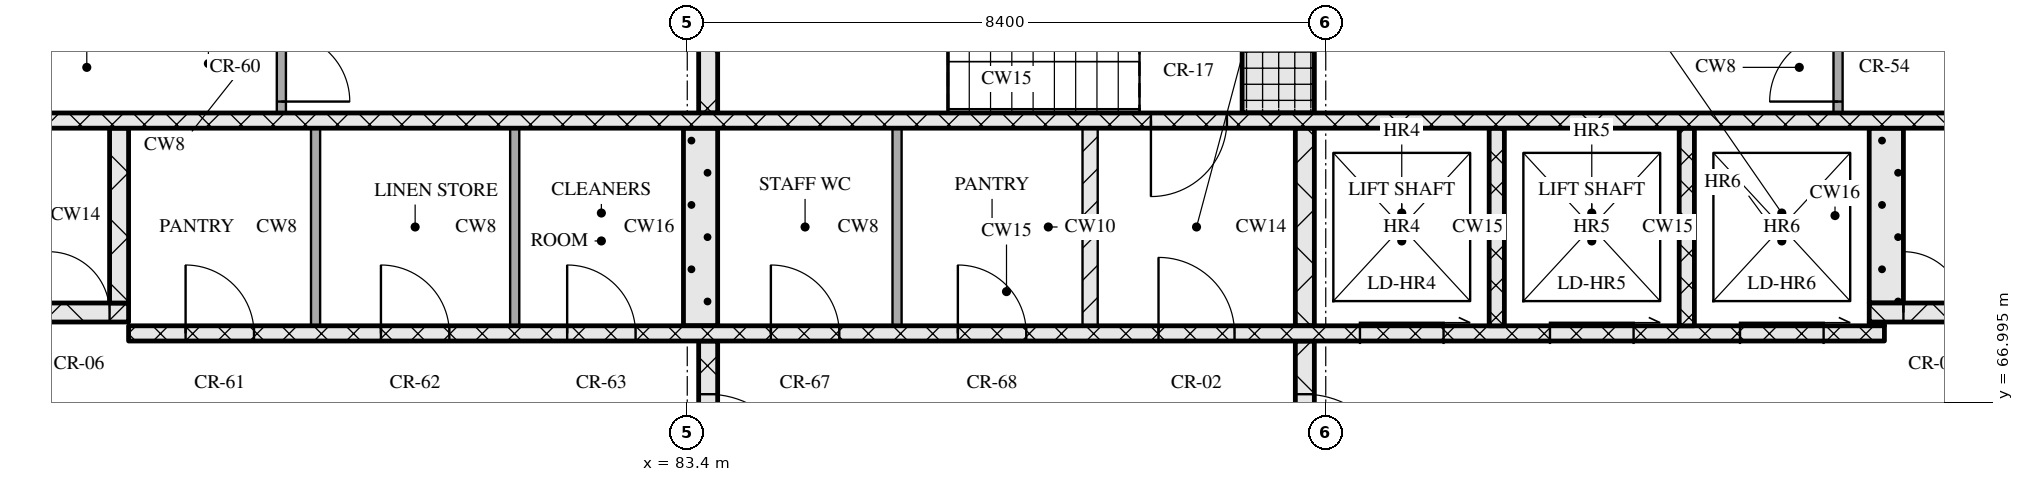
"""IFC4 building model, lengths in metres.
Left out: names, types, materials, properties, quantities, classifications, styles, units other than length and angle.
Written with IfcOpenShell. Run it as: python <this file> out.ifc"""

import sys

from ifc_helpers import new_model, si_unit, direction, frame, frame_2d, origin, place, context, subcontext, project, spatial, rectangle, extrude, element, fill, save


model = new_model("IFC4")
c1 = context("Model", 3, precision=1e-05, world=origin(), true_north=direction((0.0, 1.0)))
c2 = subcontext(c1, "Body", "Model", "MODEL_VIEW")
j1 = project(units=[si_unit("LENGTHUNIT", "METRE"), si_unit("PLANEANGLEUNIT", "RADIAN")], contexts=[c1])
p1 = place(None, origin())
s1 = spatial("IfcSite", under=j1, at=p1, CompositionType="ELEMENT")
p2 = place(p1, origin())
s2 = spatial("IfcBuilding", under=s1, at=p2, CompositionType="ELEMENT")
p3 = place(p2, frame((0.0, 0.0, 237.9)))
s3 = spatial("IfcBuildingStorey", under=s2, at=p3, CompositionType="ELEMENT", Elevation=237.9)
p4 = place(p3, frame((83.675, 65.2, 0.0), z_axis=(0.0, 0.0, 1.0), x_axis=(0.0, 1.0, 0.0)))
e1 = element("IfcWall", 1, at=p4, inside=s3, PredefinedType="SOLIDWALL", context=c2, shape_type="SweptSolid", body=[
    extrude(rectangle(XDim=2.6, YDim=0.25, at=frame_2d((1.3, 0.0))), origin(), (0.0, 0.0, 1.0), 3.32),
])
p5 = place(p4, frame((0.7, 0.0, 0.0)))
e2 = element("IfcOpeningElement", 2, at=p5, cuts=e1, PredefinedType="OPENING", context=c2, shape_type="SweptSolid", body=[
    extrude(rectangle(XDim=1.2, YDim=2.1, at=frame_2d((0.6, 1.05))), frame((0.0, 0.135, 0.0), z_axis=(0.0, -1.0, 0.0), x_axis=(1.0, 0.0, 0.0)), (0.0, 0.0, 1.0), 0.27),
])
p6 = place(p3, frame((91.525, 65.2, 0.0), z_axis=(0.0, 0.0, 1.0), x_axis=(0.0, 1.0, 0.0)))
e3 = element("IfcWall", 3, at=p6, inside=s3, PredefinedType="SOLIDWALL", context=c2, shape_type="SweptSolid", body=[
    extrude(rectangle(XDim=2.6, YDim=0.25, at=frame_2d((1.3, 0.0))), origin(), (0.0, 0.0, 1.0), 3.32),
])
p7 = place(p6, frame((0.7, 0.0, 0.0)))
e4 = element("IfcOpeningElement", 4, at=p7, cuts=e3, PredefinedType="OPENING", context=c2, shape_type="SweptSolid", body=[
    extrude(rectangle(XDim=1.2, YDim=2.1, at=frame_2d((0.6, 1.05))), frame((0.0, 0.135, 0.0), z_axis=(0.0, -1.0, 0.0), x_axis=(1.0, 0.0, 0.0)), (0.0, 0.0, 1.0), 0.27),
])
p8 = place(p3, frame((76.05, 67.9, 0.0), z_axis=(0.0, 0.0, 1.0), x_axis=(1.0, 0.0, 0.0)))
e5 = element("IfcWall", 5, at=p8, inside=s3, PredefinedType="SOLIDWALL", context=c2, shape_type="SweptSolid", body=[
    extrude(rectangle(XDim=23.1, YDim=0.2, at=frame_2d((11.55, 0.0))), origin(), (0.0, 0.0, 1.0), 3.32),
])
p9 = place(p8, frame((0.75, 0.0, 0.0)))
e6 = element("IfcOpeningElement", 6, at=p9, cuts=e5, PredefinedType="OPENING", context=c2, shape_type="SweptSolid", body=[
    extrude(rectangle(XDim=0.9, YDim=2.1, at=frame_2d((0.45, 1.05))), frame((0.0, 0.11, 0.0), z_axis=(0.0, -1.0, 0.0), x_axis=(1.0, 0.0, 0.0)), (0.0, 0.0, 1.0), 0.22),
])
p10 = place(p8, frame((3.32, 0.0, 0.0)))
e7 = element("IfcOpeningElement", 7, at=p10, cuts=e5, PredefinedType="OPENING", context=c2, shape_type="SweptSolid", body=[
    extrude(rectangle(XDim=0.9, YDim=2.1, at=frame_2d((0.45, 1.05))), frame((0.0, 0.11, 0.0), z_axis=(0.0, -1.0, 0.0), x_axis=(1.0, 0.0, 0.0)), (0.0, 0.0, 1.0), 0.22),
])
p11 = place(p8, frame((5.77, 0.0, 0.0)))
e8 = element("IfcOpeningElement", 8, at=p11, cuts=e5, PredefinedType="OPENING", context=c2, shape_type="SweptSolid", body=[
    extrude(rectangle(XDim=0.9, YDim=2.1, at=frame_2d((0.45, 1.05))), frame((0.0, 0.11, 0.0), z_axis=(0.0, -1.0, 0.0), x_axis=(1.0, 0.0, 0.0)), (0.0, 0.0, 1.0), 0.22),
])
p12 = place(p8, frame((8.45, 0.0, 0.0)))
e9 = element("IfcOpeningElement", 9, at=p12, cuts=e5, PredefinedType="OPENING", context=c2, shape_type="SweptSolid", body=[
    extrude(rectangle(XDim=0.9, YDim=2.1, at=frame_2d((0.45, 1.05))), frame((0.0, 0.11, 0.0), z_axis=(0.0, -1.0, 0.0), x_axis=(1.0, 0.0, 0.0)), (0.0, 0.0, 1.0), 0.22),
])
p13 = place(p8, frame((10.91, 0.0, 0.0)))
e10 = element("IfcOpeningElement", 10, at=p13, cuts=e5, PredefinedType="OPENING", context=c2, shape_type="SweptSolid", body=[
    extrude(rectangle(XDim=0.9, YDim=2.1, at=frame_2d((0.45, 1.05))), frame((0.0, 0.11, 0.0), z_axis=(0.0, -1.0, 0.0), x_axis=(1.0, 0.0, 0.0)), (0.0, 0.0, 1.0), 0.22),
])
p14 = place(p8, frame((13.55, 0.0, 0.0)))
e11 = element("IfcOpeningElement", 11, at=p14, cuts=e5, PredefinedType="OPENING", context=c2, shape_type="SweptSolid", body=[
    extrude(rectangle(XDim=1.0, YDim=2.1, at=frame_2d((0.5, 1.05))), frame((0.0, 0.11, 0.0), z_axis=(0.0, -1.0, 0.0), x_axis=(1.0, 0.0, 0.0)), (0.0, 0.0, 1.0), 0.22),
])
p15 = place(p8, frame((16.2, 0.0, 0.0)))
e12 = element("IfcOpeningElement", 12, at=p15, cuts=e5, PredefinedType="OPENING", context=c2, shape_type="SweptSolid", body=[
    extrude(rectangle(XDim=1.1, YDim=2.1, at=frame_2d((0.55, 1.05))), frame((0.0, 0.11, 0.0), z_axis=(0.0, -1.0, 0.0), x_axis=(1.0, 0.0, 0.0)), (0.0, 0.0, 1.0), 0.22),
])
p16 = place(p8, frame((18.7, 0.0, 0.0)))
e13 = element("IfcOpeningElement", 13, at=p16, cuts=e5, PredefinedType="OPENING", context=c2, shape_type="SweptSolid", body=[
    extrude(rectangle(XDim=1.1, YDim=2.1, at=frame_2d((0.55, 1.05))), frame((0.0, 0.11, 0.0), z_axis=(0.0, -1.0, 0.0), x_axis=(1.0, 0.0, 0.0)), (0.0, 0.0, 1.0), 0.22),
])
p17 = place(p8, frame((21.2, 0.0, 0.0)))
e14 = element("IfcOpeningElement", 14, at=p17, cuts=e5, PredefinedType="OPENING", context=c2, shape_type="SweptSolid", body=[
    extrude(rectangle(XDim=1.1, YDim=2.1, at=frame_2d((0.55, 1.05))), frame((0.0, 0.11, 0.0), z_axis=(0.0, -1.0, 0.0), x_axis=(1.0, 0.0, 0.0)), (0.0, 0.0, 1.0), 0.22),
])
for number, where, z_axis, x_axis in (
    (15, (78.51, 68.0, 0.0), (0.0, 0.0, 1.0), (0.0, 1.0, 0.0)),
    (16, (81.13, 68.0, 0.0), (0.0, 0.0, 1.0), (0.0, 1.0, 0.0)),
):
    element("IfcWall", number, at=place(p3, frame(where, z_axis=z_axis, x_axis=x_axis)), inside=s3, PredefinedType="PARTITIONING", context=c2, shape_type="SweptSolid", body=[
        extrude(rectangle(XDim=2.6, YDim=0.12, at=frame_2d((1.3, 0.0))), origin(), (0.0, 0.0, 1.0), 3.32),
    ])
p18 = place(p3, frame((83.575, 68.0, 0.0), z_axis=(0.0, 0.0, 1.0), x_axis=(0.0, 1.0, 0.0)))
e17 = element("IfcWall", 17, at=p18, inside=s3, PredefinedType="SOLIDWALL", context=c2, shape_type="SweptSolid", body=[
    extrude(rectangle(XDim=2.6, YDim=0.45, at=frame_2d((1.3, 0.0))), origin(), (0.0, 0.0, 1.0), 3.32),
])
p19 = place(p3, frame((86.16, 68.0, 0.0), z_axis=(0.0, 0.0, 1.0), x_axis=(0.0, 1.0, 0.0)))
e18 = element("IfcWall", 18, at=p19, inside=s3, PredefinedType="PARTITIONING", context=c2, shape_type="SweptSolid", body=[
    extrude(rectangle(XDim=2.6, YDim=0.12, at=frame_2d((1.3, 0.0))), origin(), (0.0, 0.0, 1.0), 3.32),
])
p20 = place(p3, frame((88.7, 68.0, 0.0), z_axis=(0.0, 0.0, 1.0), x_axis=(0.0, 1.0, 0.0)))
e19 = element("IfcWall", 19, at=p20, inside=s3, PredefinedType="PARTITIONING", context=c2, shape_type="SweptSolid", body=[
    extrude(rectangle(XDim=2.6, YDim=0.2, at=frame_2d((1.3, 0.0))), origin(), (0.0, 0.0, 1.0), 3.32),
])
p21 = place(p3, frame((91.525, 68.0, 0.0), z_axis=(0.0, 0.0, 1.0), x_axis=(0.0, 1.0, 0.0)))
e20 = element("IfcWall", 20, at=p21, inside=s3, PredefinedType="SOLIDWALL", context=c2, shape_type="SweptSolid", body=[
    extrude(rectangle(XDim=2.6, YDim=0.25, at=frame_2d((1.3, 0.0))), origin(), (0.0, 0.0, 1.0), 3.32),
])
for number, where, z_axis, x_axis in (
    (21, (94.05, 68.0, 0.0), (0.0, 0.0, 1.0), (0.0, 1.0, 0.0)),
    (22, (96.55, 68.0, 0.0), (0.0, 0.0, 1.0), (0.0, 1.0, 0.0)),
):
    element("IfcWall", number, at=place(p3, frame(where, z_axis=z_axis, x_axis=x_axis)), inside=s3, PredefinedType="SOLIDWALL", context=c2, shape_type="SweptSolid", body=[
        extrude(rectangle(XDim=2.6, YDim=0.2, at=frame_2d((1.3, 0.0))), origin(), (0.0, 0.0, 1.0), 3.32),
    ])
p22 = place(p3, frame((98.95, 68.025, 0.0), z_axis=(0.0, 0.0, 1.0), x_axis=(1.0, 0.0, 0.0)))
e23 = element("IfcWall", 23, at=p22, inside=s3, PredefinedType="SOLIDWALL", context=c2, shape_type="SweptSolid", body=[
    extrude(rectangle(XDim=0.2, YDim=0.05, at=frame_2d((0.1, 0.0))), origin(), (0.0, 0.0, 1.0), 3.32),
])
p23 = place(p3, frame((67.8, 68.175, 0.0), z_axis=(0.0, 0.0, 1.0), x_axis=(1.0, 0.0, 0.0)))
e24 = element("IfcWall", 24, at=p23, inside=s3, PredefinedType="SOLIDWALL", context=c2, shape_type="SweptSolid", body=[
    extrude(rectangle(XDim=8.25, YDim=0.25, at=frame_2d((4.125, 0.0))), origin(), (0.0, 0.0, 1.0), 3.32),
])
p24 = place(p23, frame((5.7, 0.0, 0.0)))
e25 = element("IfcOpeningElement", 25, at=p24, cuts=e24, PredefinedType="OPENING", context=c2, shape_type="SweptSolid", body=[
    extrude(rectangle(XDim=1.0, YDim=2.1, at=frame_2d((0.5, 1.05))), frame((0.0, 0.135, 0.0), z_axis=(0.0, -1.0, 0.0), x_axis=(1.0, 0.0, 0.0)), (0.0, 0.0, 1.0), 0.27),
])
p25 = place(p23, frame((7.2, 0.0, 0.0)))
e26 = element("IfcOpeningElement", 26, at=p25, cuts=e24, PredefinedType="OPENING", context=c2, shape_type="SweptSolid", body=[
    extrude(rectangle(XDim=0.8, YDim=2.1, at=frame_2d((0.4, 1.05))), frame((0.0, 0.135, 0.0), z_axis=(0.0, -1.0, 0.0), x_axis=(1.0, 0.0, 0.0)), (0.0, 0.0, 1.0), 0.27),
])
p26 = place(p3, frame((98.95, 68.175, 0.0), z_axis=(0.0, 0.0, 1.0), x_axis=(1.0, 0.0, 0.0)))
e27 = element("IfcWall", 27, at=p26, inside=s3, PredefinedType="SOLIDWALL", context=c2, shape_type="SweptSolid", body=[
    extrude(rectangle(XDim=8.45, YDim=0.25, at=frame_2d((4.225, 0.0))), origin(), (0.0, 0.0, 1.0), 3.32),
])
p27 = place(p26, frame((0.45, 0.0, 0.0)))
e28 = element("IfcOpeningElement", 28, at=p27, cuts=e27, PredefinedType="OPENING", context=c2, shape_type="SweptSolid", body=[
    extrude(rectangle(XDim=0.8, YDim=2.1, at=frame_2d((0.4, 1.05))), frame((0.0, 0.135, 0.0), z_axis=(0.0, -1.0, 0.0), x_axis=(1.0, 0.0, 0.0)), (0.0, 0.0, 1.0), 0.27),
])
p28 = place(p26, frame((1.75, 0.0, 0.0)))
e29 = element("IfcOpeningElement", 29, at=p28, cuts=e27, PredefinedType="OPENING", context=c2, shape_type="SweptSolid", body=[
    extrude(rectangle(XDim=1.0, YDim=2.1, at=frame_2d((0.5, 1.05))), frame((0.0, 0.135, 0.0), z_axis=(0.0, -1.0, 0.0), x_axis=(1.0, 0.0, 0.0)), (0.0, 0.0, 1.0), 0.27),
])
p29 = place(p3, frame((75.925, 68.3, 0.0), z_axis=(0.0, 0.0, 1.0), x_axis=(0.0, 1.0, 0.0)))
e30 = element("IfcWall", 30, at=p29, inside=s3, PredefinedType="SOLIDWALL", context=c2, shape_type="SweptSolid", body=[
    extrude(rectangle(XDim=2.3, YDim=0.25, at=frame_2d((1.15, 0.0))), origin(), (0.0, 0.0, 1.0), 3.32),
])
p30 = place(p3, frame((99.175, 68.3, 0.0), z_axis=(0.0, 0.0, 1.0), x_axis=(0.0, 1.0, 0.0)))
e31 = element("IfcWall", 31, at=p30, inside=s3, PredefinedType="SOLIDWALL", context=c2, shape_type="SweptSolid", body=[
    extrude(rectangle(XDim=2.3, YDim=0.45, at=frame_2d((1.15, 0.0))), origin(), (0.0, 0.0, 1.0), 3.32),
])
p31 = place(p3, frame((67.8, 70.7, 0.0), z_axis=(0.0, 0.0, 1.0), x_axis=(1.0, 0.0, 0.0)))
e32 = element("IfcWall", 32, at=p31, inside=s3, PredefinedType="SOLIDWALL", context=c2, shape_type="SweptSolid", body=[
    extrude(rectangle(XDim=39.6, YDim=0.2, at=frame_2d((19.8, 0.0))), origin(), (0.0, 0.0, 1.0), 3.32),
])
p32 = place(p31, frame((0.65, 0.0, 0.0)))
e33 = element("IfcOpeningElement", 33, at=p32, cuts=e32, PredefinedType="OPENING", context=c2, shape_type="SweptSolid", body=[
    extrude(rectangle(XDim=1.1, YDim=2.1, at=frame_2d((0.55, 1.05))), frame((0.0, 0.11, 0.0), z_axis=(0.0, -1.0, 0.0), x_axis=(1.0, 0.0, 0.0)), (0.0, 0.0, 1.0), 0.22),
])
p33 = place(p31, frame((3.25, 0.0, 0.0)))
e34 = element("IfcOpeningElement", 34, at=p33, cuts=e32, PredefinedType="OPENING", context=c2, shape_type="SweptSolid", body=[
    extrude(rectangle(XDim=1.1, YDim=2.1, at=frame_2d((0.55, 1.05))), frame((0.0, 0.11, 0.0), z_axis=(0.0, -1.0, 0.0), x_axis=(1.0, 0.0, 0.0)), (0.0, 0.0, 1.0), 0.22),
])
p34 = place(p31, frame((5.9, 0.0, 0.0)))
e35 = element("IfcOpeningElement", 35, at=p34, cuts=e32, PredefinedType="OPENING", context=c2, shape_type="SweptSolid", body=[
    extrude(rectangle(XDim=1.0, YDim=2.1, at=frame_2d((0.5, 1.05))), frame((0.0, 0.11, 0.0), z_axis=(0.0, -1.0, 0.0), x_axis=(1.0, 0.0, 0.0)), (0.0, 0.0, 1.0), 0.22),
])
p35 = place(p31, frame((21.7, 0.0, 0.0)))
e36 = element("IfcOpeningElement", 36, at=p35, cuts=e32, PredefinedType="OPENING", context=c2, shape_type="SweptSolid", body=[
    extrude(rectangle(XDim=1.0, YDim=2.1, at=frame_2d((0.5, 1.05))), frame((0.0, 0.11, 0.0), z_axis=(0.0, -1.0, 0.0), x_axis=(1.0, 0.0, 0.0)), (0.0, 0.0, 1.0), 0.22),
])
p36 = place(p31, frame((32.7, 0.0, 0.0)))
e37 = element("IfcOpeningElement", 37, at=p36, cuts=e32, PredefinedType="OPENING", context=c2, shape_type="SweptSolid", body=[
    extrude(rectangle(XDim=1.0, YDim=2.1, at=frame_2d((0.5, 1.05))), frame((0.0, 0.11, 0.0), z_axis=(0.0, -1.0, 0.0), x_axis=(1.0, 0.0, 0.0)), (0.0, 0.0, 1.0), 0.22),
])
p37 = place(p31, frame((35.25, 0.0, 0.0)))
e38 = element("IfcOpeningElement", 38, at=p37, cuts=e32, PredefinedType="OPENING", context=c2, shape_type="SweptSolid", body=[
    extrude(rectangle(XDim=1.1, YDim=2.1, at=frame_2d((0.55, 1.05))), frame((0.0, 0.11, 0.0), z_axis=(0.0, -1.0, 0.0), x_axis=(1.0, 0.0, 0.0)), (0.0, 0.0, 1.0), 0.22),
])
p38 = place(p31, frame((37.85, 0.0, 0.0)))
e39 = element("IfcOpeningElement", 39, at=p38, cuts=e32, PredefinedType="OPENING", context=c2, shape_type="SweptSolid", body=[
    extrude(rectangle(XDim=1.1, YDim=2.1, at=frame_2d((0.55, 1.05))), frame((0.0, 0.11, 0.0), z_axis=(0.0, -1.0, 0.0), x_axis=(1.0, 0.0, 0.0)), (0.0, 0.0, 1.0), 0.22),
])
p39 = place(p3, frame((78.06, 70.8, 0.0), z_axis=(0.0, 0.0, 1.0), x_axis=(0.0, 1.0, 0.0)))
e40 = element("IfcWall", 40, at=p39, inside=s3, PredefinedType="PARTITIONING", context=c2, shape_type="SweptSolid", body=[
    extrude(rectangle(XDim=1.2, YDim=0.12, at=frame_2d((0.6, 0.0))), origin(), (0.0, 0.0, 1.0), 3.32),
])
p40 = place(p39, frame((0.15, 0.0, 0.0)))
e41 = element("IfcOpeningElement", 41, at=p40, cuts=e40, PredefinedType="OPENING", context=c2, shape_type="SweptSolid", body=[
    extrude(rectangle(XDim=0.9, YDim=2.1, at=frame_2d((0.45, 1.05))), frame((0.0, 0.07, 0.0), z_axis=(0.0, -1.0, 0.0), x_axis=(1.0, 0.0, 0.0)), (0.0, 0.0, 1.0), 0.14),
])
p41 = place(p3, frame((83.675, 70.8, 0.0), z_axis=(0.0, 0.0, 1.0), x_axis=(0.0, 1.0, 0.0)))
e42 = element("IfcWall", 42, at=p41, inside=s3, PredefinedType="SOLIDWALL", context=c2, shape_type="SweptSolid", body=[
    extrude(rectangle(XDim=2.95, YDim=0.25, at=frame_2d((1.475, 0.0))), origin(), (0.0, 0.0, 1.0), 3.32),
])
p42 = place(p3, frame((91.175, 70.8, 0.0), z_axis=(0.0, 0.0, 1.0), x_axis=(0.0, 1.0, 0.0)))
e43 = element("IfcWall", 43, at=p42, inside=s3, PredefinedType="SOLIDWALL", context=c2, shape_type="SweptSolid", body=[
    extrude(rectangle(XDim=2.95, YDim=0.95, at=frame_2d((1.475, 0.0))), origin(), (0.0, 0.0, 1.0), 3.32),
])
p43 = place(p3, frame((98.54, 70.8, 0.0), z_axis=(0.0, 0.0, 1.0), x_axis=(0.0, 1.0, 0.0)))
e44 = element("IfcWall", 44, at=p43, inside=s3, PredefinedType="PARTITIONING", context=c2, shape_type="SweptSolid", body=[
    extrude(rectangle(XDim=1.2, YDim=0.12, at=frame_2d((0.6, 0.0))), origin(), (0.0, 0.0, 1.0), 3.32),
])
p44 = place(p43, frame((0.15, 0.0, 0.0)))
e45 = element("IfcOpeningElement", 45, at=p44, cuts=e44, PredefinedType="OPENING", context=c2, shape_type="SweptSolid", body=[
    extrude(rectangle(XDim=0.9, YDim=2.1, at=frame_2d((0.45, 1.05))), frame((0.0, 0.07, 0.0), z_axis=(0.0, -1.0, 0.0), x_axis=(1.0, 0.0, 0.0)), (0.0, 0.0, 1.0), 0.14),
])
p45 = place(p5, origin())
e46 = element("IfcDoor", 46, at=p45, inside=s3, OperationType="SINGLE_SWING_RIGHT", PredefinedType="DOOR", context=c2, shape_type="SweptSolid", body=[
    extrude(rectangle(XDim=1.2, YDim=2.1, at=frame_2d((0.6, 1.05))), frame((0.0, 0.025, 0.0), z_axis=(0.0, -1.0, 0.0), x_axis=(1.0, 0.0, 0.0)), (0.0, 0.0, 1.0), 0.05),
])
fill(e2, e46)
p46 = place(p7, origin())
e47 = element("IfcDoor", 47, at=p46, inside=s3, OperationType="SINGLE_SWING_RIGHT", PredefinedType="DOOR", context=c2, shape_type="SweptSolid", body=[
    extrude(rectangle(XDim=1.2, YDim=2.1, at=frame_2d((0.6, 1.05))), frame((0.0, 0.025, 0.0), z_axis=(0.0, -1.0, 0.0), x_axis=(1.0, 0.0, 0.0)), (0.0, 0.0, 1.0), 0.05),
])
fill(e4, e47)
p47 = place(p9, origin())
e48 = element("IfcDoor", 48, at=p47, inside=s3, OperationType="SINGLE_SWING_LEFT", PredefinedType="DOOR", context=c2, shape_type="SweptSolid", body=[
    extrude(rectangle(XDim=0.9, YDim=2.1, at=frame_2d((0.45, 1.05))), frame((0.0, 0.025, 0.0), z_axis=(0.0, -1.0, 0.0), x_axis=(1.0, 0.0, 0.0)), (0.0, 0.0, 1.0), 0.05),
])
fill(e6, e48)
p48 = place(p10, origin())
e49 = element("IfcDoor", 49, at=p48, inside=s3, OperationType="SINGLE_SWING_LEFT", PredefinedType="DOOR", context=c2, shape_type="SweptSolid", body=[
    extrude(rectangle(XDim=0.9, YDim=2.1, at=frame_2d((0.45, 1.05))), frame((0.0, 0.025, 0.0), z_axis=(0.0, -1.0, 0.0), x_axis=(1.0, 0.0, 0.0)), (0.0, 0.0, 1.0), 0.05),
])
fill(e7, e49)
p49 = place(p11, origin())
e50 = element("IfcDoor", 50, at=p49, inside=s3, OperationType="SINGLE_SWING_LEFT", PredefinedType="DOOR", context=c2, shape_type="SweptSolid", body=[
    extrude(rectangle(XDim=0.9, YDim=2.1, at=frame_2d((0.45, 1.05))), frame((0.0, 0.025, 0.0), z_axis=(0.0, -1.0, 0.0), x_axis=(1.0, 0.0, 0.0)), (0.0, 0.0, 1.0), 0.05),
])
fill(e8, e50)
p50 = place(p12, origin())
e51 = element("IfcDoor", 51, at=p50, inside=s3, OperationType="SINGLE_SWING_LEFT", PredefinedType="DOOR", context=c2, shape_type="SweptSolid", body=[
    extrude(rectangle(XDim=0.9, YDim=2.1, at=frame_2d((0.45, 1.05))), frame((0.0, 0.025, 0.0), z_axis=(0.0, -1.0, 0.0), x_axis=(1.0, 0.0, 0.0)), (0.0, 0.0, 1.0), 0.05),
])
fill(e9, e51)
p51 = place(p13, origin())
e52 = element("IfcDoor", 52, at=p51, inside=s3, OperationType="SINGLE_SWING_LEFT", PredefinedType="DOOR", context=c2, shape_type="SweptSolid", body=[
    extrude(rectangle(XDim=0.9, YDim=2.1, at=frame_2d((0.45, 1.05))), frame((0.0, 0.025, 0.0), z_axis=(0.0, -1.0, 0.0), x_axis=(1.0, 0.0, 0.0)), (0.0, 0.0, 1.0), 0.05),
])
fill(e10, e52)
p52 = place(p14, origin())
e53 = element("IfcDoor", 53, at=p52, inside=s3, OperationType="SINGLE_SWING_LEFT", PredefinedType="DOOR", context=c2, shape_type="SweptSolid", body=[
    extrude(rectangle(XDim=1.0, YDim=2.1, at=frame_2d((0.5, 1.05))), frame((0.0, 0.025, 0.0), z_axis=(0.0, -1.0, 0.0), x_axis=(1.0, 0.0, 0.0)), (0.0, 0.0, 1.0), 0.05),
])
fill(e11, e53)
p53 = place(p15, origin())
e54 = element("IfcDoor", 54, at=p53, inside=s3, OperationType="SLIDING_TO_RIGHT", PredefinedType="DOOR", context=c2, shape_type="SweptSolid", body=[
    extrude(rectangle(XDim=1.1, YDim=2.1, at=frame_2d((0.55, 1.05))), frame((0.0, 0.025, 0.0), z_axis=(0.0, -1.0, 0.0), x_axis=(1.0, 0.0, 0.0)), (0.0, 0.0, 1.0), 0.05),
])
fill(e12, e54)
p54 = place(p16, origin())
e55 = element("IfcDoor", 55, at=p54, inside=s3, OperationType="SLIDING_TO_RIGHT", PredefinedType="DOOR", context=c2, shape_type="SweptSolid", body=[
    extrude(rectangle(XDim=1.1, YDim=2.1, at=frame_2d((0.55, 1.05))), frame((0.0, 0.025, 0.0), z_axis=(0.0, -1.0, 0.0), x_axis=(1.0, 0.0, 0.0)), (0.0, 0.0, 1.0), 0.05),
])
fill(e13, e55)
p55 = place(p17, origin())
e56 = element("IfcDoor", 56, at=p55, inside=s3, OperationType="SLIDING_TO_RIGHT", PredefinedType="DOOR", context=c2, shape_type="SweptSolid", body=[
    extrude(rectangle(XDim=1.1, YDim=2.1, at=frame_2d((0.55, 1.05))), frame((0.0, 0.025, 0.0), z_axis=(0.0, -1.0, 0.0), x_axis=(1.0, 0.0, 0.0)), (0.0, 0.0, 1.0), 0.05),
])
fill(e14, e56)
p56 = place(p25, origin())
e57 = element("IfcDoor", 57, at=p56, inside=s3, OperationType="SINGLE_SWING_LEFT", PredefinedType="DOOR", context=c2, shape_type="SweptSolid", body=[
    extrude(rectangle(XDim=0.8, YDim=2.1, at=frame_2d((0.4, 1.05))), frame((0.0, 0.025, 0.0), z_axis=(0.0, -1.0, 0.0), x_axis=(1.0, 0.0, 0.0)), (0.0, 0.0, 1.0), 0.05),
])
fill(e26, e57)
p57 = place(p27, origin())
e58 = element("IfcDoor", 58, at=p57, inside=s3, OperationType="SINGLE_SWING_LEFT", PredefinedType="DOOR", context=c2, shape_type="SweptSolid", body=[
    extrude(rectangle(XDim=0.8, YDim=2.1, at=frame_2d((0.4, 1.05))), frame((0.0, 0.025, 0.0), z_axis=(0.0, -1.0, 0.0), x_axis=(1.0, 0.0, 0.0)), (0.0, 0.0, 1.0), 0.05),
])
fill(e28, e58)
p58 = place(p35, origin())
e59 = element("IfcDoor", 59, at=p58, inside=s3, OperationType="SINGLE_SWING_RIGHT", PredefinedType="DOOR", context=c2, shape_type="SweptSolid", body=[
    extrude(rectangle(XDim=1.0, YDim=2.1, at=frame_2d((0.5, 1.05))), frame((0.0, 0.025, 0.0), z_axis=(0.0, -1.0, 0.0), x_axis=(1.0, 0.0, 0.0)), (0.0, 0.0, 1.0), 0.05),
])
fill(e36, e59)
p59 = place(p40, origin())
e60 = element("IfcDoor", 60, at=p59, inside=s3, OperationType="SINGLE_SWING_RIGHT", PredefinedType="DOOR", context=c2, shape_type="SweptSolid", body=[
    extrude(rectangle(XDim=0.9, YDim=2.1, at=frame_2d((0.45, 1.05))), frame((0.0, 0.025, 0.0), z_axis=(0.0, -1.0, 0.0), x_axis=(1.0, 0.0, 0.0)), (0.0, 0.0, 1.0), 0.05),
])
fill(e41, e60)
p60 = place(p44, origin())
e61 = element("IfcDoor", 61, at=p60, inside=s3, OperationType="SINGLE_SWING_LEFT", PredefinedType="DOOR", context=c2, shape_type="SweptSolid", body=[
    extrude(rectangle(XDim=0.9, YDim=2.1, at=frame_2d((0.45, 1.05))), frame((0.0, 0.025, 0.0), z_axis=(0.0, -1.0, 0.0), x_axis=(1.0, 0.0, 0.0)), (0.0, 0.0, 1.0), 0.05),
])
fill(e45, e61)
save(model, sys.argv[1])
